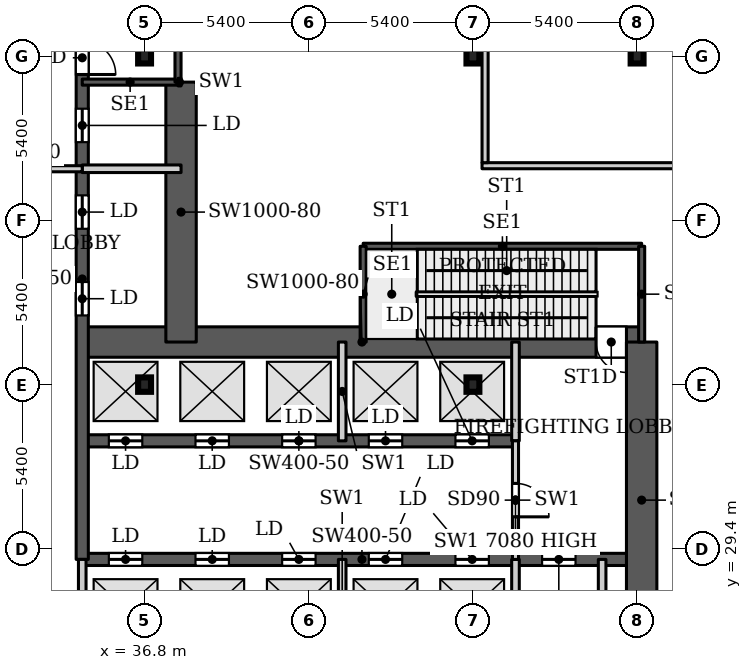
"""IFC4 building model, lengths in metres.
Left out: names, types, materials, properties, quantities, classifications, styles, units other than length and angle.
Written with IfcOpenShell. Run it as: python <this file> out.ifc"""

import sys

from ifc_helpers import new_model, si_unit, direction, frame, frame_2d, origin, origin_2d, place, context, subcontext, project, spatial, rectangle, i_section, extrude, source, transform, mapped, element, fill, save


model = new_model("IFC4")
c1 = context("Model", 3, precision=1e-05, world=origin(), true_north=direction((0.0, 1.0)))
c2 = subcontext(c1, "Body", "Model", "MODEL_VIEW")
j1 = project(units=[si_unit("LENGTHUNIT", "METRE"), si_unit("PLANEANGLEUNIT", "RADIAN")], contexts=[c1])
p1 = place(None, origin())
s1 = spatial("IfcSite", under=j1, at=p1, CompositionType="ELEMENT")
p2 = place(p1, origin())
s2 = spatial("IfcBuilding", under=s1, at=p2, CompositionType="ELEMENT")
p3 = place(p2, origin())
s3 = spatial("IfcBuildingStorey", under=s2, at=p3, CompositionType="ELEMENT", Elevation=0.0)
for number, where, z_axis, x_axis in (
    (1, (36.8, 34.8, 0.0), (0.0, 0.0, 1.0), (1.0, 0.0, 0.0)),
    (2, (47.6, 34.8, 0.0), (0.0, 0.0, 1.0), (1.0, 0.0, 0.0)),
    (3, (36.8, 45.6, 0.0), (0.0, 0.0, 1.0), (1.0, 0.0, 0.0)),
    (4, (47.6, 45.6, 0.0), (0.0, 0.0, 1.0), (1.0, 0.0, 0.0)),
    (5, (53.0, 45.6, 0.0), (0.0, 0.0, 1.0), (1.0, 0.0, 0.0)),
):
    element("IfcColumn", number, at=place(p3, frame(where, z_axis=z_axis, x_axis=x_axis)), inside=s3, PredefinedType="COLUMN", context=c2, shape_type="SweptSolid", body=[
        extrude(i_section(OverallWidth=0.424, OverallDepth=0.474, WebThickness=0.048, FlangeThickness=0.077, FilletRadius=0.014, at=origin_2d()), origin(), (0.0, 0.0, 1.0), 7.5),
    ])
p4 = place(p3, frame((34.75, 29.05, 0.0), z_axis=(0.0, 0.0, 1.0), x_axis=(1.0, 0.0, 0.0)))
e6 = element("IfcWall", 6, at=p4, inside=s3, PredefinedType="SHEAR", context=c2, shape_type="SweptSolid", body=[
    extrude(rectangle(XDim=18.4, YDim=0.4, at=frame_2d((9.2, 0.0))), origin(), (0.0, 0.0, 1.0), 7.5),
])
p5 = place(p4, frame((0.875, 0.0, 0.0)))
e7 = element("IfcOpeningElement", 7, at=p5, cuts=e6, PredefinedType="OPENING", context=c2, shape_type="SweptSolid", body=[
    extrude(rectangle(XDim=1.1, YDim=2.2, at=frame_2d((0.55, 1.1))), frame((0.0, 0.21, 0.0), z_axis=(0.0, -1.0, 0.0), x_axis=(1.0, 0.0, 0.0)), (0.0, 0.0, 1.0), 0.42),
])
p6 = place(p4, frame((3.725, 0.0, 0.0)))
e8 = element("IfcOpeningElement", 8, at=p6, cuts=e6, PredefinedType="OPENING", context=c2, shape_type="SweptSolid", body=[
    extrude(rectangle(XDim=1.1, YDim=2.2, at=frame_2d((0.55, 1.1))), frame((0.0, 0.21, 0.0), z_axis=(0.0, -1.0, 0.0), x_axis=(1.0, 0.0, 0.0)), (0.0, 0.0, 1.0), 0.42),
])
p7 = place(p4, frame((6.575, 0.0, 0.0)))
e9 = element("IfcOpeningElement", 9, at=p7, cuts=e6, PredefinedType="OPENING", context=c2, shape_type="SweptSolid", body=[
    extrude(rectangle(XDim=1.1, YDim=2.2, at=frame_2d((0.55, 1.1))), frame((0.0, 0.21, 0.0), z_axis=(0.0, -1.0, 0.0), x_axis=(1.0, 0.0, 0.0)), (0.0, 0.0, 1.0), 0.42),
])
p8 = place(p4, frame((9.425, 0.0, 0.0)))
e10 = element("IfcOpeningElement", 10, at=p8, cuts=e6, PredefinedType="OPENING", context=c2, shape_type="SweptSolid", body=[
    extrude(rectangle(XDim=1.1, YDim=2.2, at=frame_2d((0.55, 1.1))), frame((0.0, 0.21, 0.0), z_axis=(0.0, -1.0, 0.0), x_axis=(1.0, 0.0, 0.0)), (0.0, 0.0, 1.0), 0.42),
])
p9 = place(p4, frame((12.275, 0.0, 0.0)))
e11 = element("IfcOpeningElement", 11, at=p9, cuts=e6, PredefinedType="OPENING", context=c2, shape_type="SweptSolid", body=[
    extrude(rectangle(XDim=1.1, YDim=2.2, at=frame_2d((0.55, 1.1))), frame((0.0, 0.21, 0.0), z_axis=(0.0, -1.0, 0.0), x_axis=(1.0, 0.0, 0.0)), (0.0, 0.0, 1.0), 0.42),
])
p10 = place(p4, frame((15.125, 0.0, 0.0)))
e12 = element("IfcOpeningElement", 12, at=p10, cuts=e6, PredefinedType="OPENING", context=c2, shape_type="SweptSolid", body=[
    extrude(rectangle(XDim=1.1, YDim=2.2, at=frame_2d((0.55, 1.1))), frame((0.0, 0.21, 0.0), z_axis=(0.0, -1.0, 0.0), x_axis=(1.0, 0.0, 0.0)), (0.0, 0.0, 1.0), 0.42),
])
p11 = place(p3, frame((34.75, 32.95, 0.0), z_axis=(0.0, 0.0, 1.0), x_axis=(1.0, 0.0, 0.0)))
e13 = element("IfcWall", 13, at=p11, inside=s3, PredefinedType="SHEAR", context=c2, shape_type="SweptSolid", body=[
    extrude(rectangle(XDim=14.25, YDim=0.4, at=frame_2d((7.125, 0.0))), origin(), (0.0, 0.0, 1.0), 7.5),
])
p12 = place(p11, frame((0.875, 0.0, 0.0)))
e14 = element("IfcOpeningElement", 14, at=p12, cuts=e13, PredefinedType="OPENING", context=c2, shape_type="SweptSolid", body=[
    extrude(rectangle(XDim=1.1, YDim=2.2, at=frame_2d((0.55, 1.1))), frame((0.0, 0.21, 0.0), z_axis=(0.0, -1.0, 0.0), x_axis=(1.0, 0.0, 0.0)), (0.0, 0.0, 1.0), 0.42),
])
p13 = place(p11, frame((3.725, 0.0, 0.0)))
e15 = element("IfcOpeningElement", 15, at=p13, cuts=e13, PredefinedType="OPENING", context=c2, shape_type="SweptSolid", body=[
    extrude(rectangle(XDim=1.1, YDim=2.2, at=frame_2d((0.55, 1.1))), frame((0.0, 0.21, 0.0), z_axis=(0.0, -1.0, 0.0), x_axis=(1.0, 0.0, 0.0)), (0.0, 0.0, 1.0), 0.42),
])
p14 = place(p11, frame((6.575, 0.0, 0.0)))
e16 = element("IfcOpeningElement", 16, at=p14, cuts=e13, PredefinedType="OPENING", context=c2, shape_type="SweptSolid", body=[
    extrude(rectangle(XDim=1.1, YDim=2.2, at=frame_2d((0.55, 1.1))), frame((0.0, 0.21, 0.0), z_axis=(0.0, -1.0, 0.0), x_axis=(1.0, 0.0, 0.0)), (0.0, 0.0, 1.0), 0.42),
])
p15 = place(p11, frame((9.425, 0.0, 0.0)))
e17 = element("IfcOpeningElement", 17, at=p15, cuts=e13, PredefinedType="OPENING", context=c2, shape_type="SweptSolid", body=[
    extrude(rectangle(XDim=1.1, YDim=2.2, at=frame_2d((0.55, 1.1))), frame((0.0, 0.21, 0.0), z_axis=(0.0, -1.0, 0.0), x_axis=(1.0, 0.0, 0.0)), (0.0, 0.0, 1.0), 0.42),
])
p16 = place(p11, frame((12.275, 0.0, 0.0)))
e18 = element("IfcOpeningElement", 18, at=p16, cuts=e13, PredefinedType="OPENING", context=c2, shape_type="SweptSolid", body=[
    extrude(rectangle(XDim=1.1, YDim=2.2, at=frame_2d((0.55, 1.1))), frame((0.0, 0.21, 0.0), z_axis=(0.0, -1.0, 0.0), x_axis=(1.0, 0.0, 0.0)), (0.0, 0.0, 1.0), 0.42),
])
p17 = place(p3, frame((34.75, 36.2, 0.0), z_axis=(0.0, 0.0, 1.0), x_axis=(1.0, 0.0, 0.0)))
e19 = element("IfcWall", 19, at=p17, inside=s3, PredefinedType="SHEAR", context=c2, shape_type="SweptSolid", body=[
    extrude(rectangle(XDim=18.4, YDim=1.0, at=frame_2d((9.2, 0.0))), origin(), (0.0, 0.0, 1.0), 7.5),
])
p18 = place(p17, frame((16.9, 0.0, 0.0)))
e20 = element("IfcOpeningElement", 20, at=p18, cuts=e19, PredefinedType="OPENING", context=c2, shape_type="SweptSolid", body=[
    extrude(rectangle(XDim=1.0, YDim=2.2, at=frame_2d((0.5, 1.1))), frame((0.0, 0.51, 0.0), z_axis=(0.0, -1.0, 0.0), x_axis=(1.0, 0.0, 0.0)), (0.0, 0.0, 1.0), 1.02),
])
p19 = place(p3, frame((34.75, 29.05, 0.0), z_axis=(0.0, 0.0, 1.0), x_axis=(0.0, 1.0, 0.0)))
e21 = element("IfcWall", 21, at=p19, inside=s3, PredefinedType="SHEAR", context=c2, shape_type="SweptSolid", body=[
    extrude(rectangle(XDim=18.45, YDim=0.4, at=frame_2d((9.225, 0.0))), origin(), (0.0, 0.0, 1.0), 7.5),
])
p20 = place(p19, frame((8.025, 0.0, 0.0)))
e22 = element("IfcOpeningElement", 22, at=p20, cuts=e21, PredefinedType="OPENING", context=c2, shape_type="SweptSolid", body=[
    extrude(rectangle(XDim=1.1, YDim=2.2, at=frame_2d((0.55, 1.1))), frame((0.0, 0.21, 0.0), z_axis=(0.0, -1.0, 0.0), x_axis=(1.0, 0.0, 0.0)), (0.0, 0.0, 1.0), 0.42),
])
p21 = place(p19, frame((10.875, 0.0, 0.0)))
e23 = element("IfcOpeningElement", 23, at=p21, cuts=e21, PredefinedType="OPENING", context=c2, shape_type="SweptSolid", body=[
    extrude(rectangle(XDim=1.1, YDim=2.2, at=frame_2d((0.55, 1.1))), frame((0.0, 0.21, 0.0), z_axis=(0.0, -1.0, 0.0), x_axis=(1.0, 0.0, 0.0)), (0.0, 0.0, 1.0), 0.42),
])
p22 = place(p19, frame((13.725, 0.0, 0.0)))
e24 = element("IfcOpeningElement", 24, at=p22, cuts=e21, PredefinedType="OPENING", context=c2, shape_type="SweptSolid", body=[
    extrude(rectangle(XDim=1.1, YDim=2.2, at=frame_2d((0.55, 1.1))), frame((0.0, 0.21, 0.0), z_axis=(0.0, -1.0, 0.0), x_axis=(1.0, 0.0, 0.0)), (0.0, 0.0, 1.0), 0.42),
])
p23 = place(p19, frame((15.95, 0.0, 0.0)))
e25 = element("IfcOpeningElement", 25, at=p23, cuts=e21, PredefinedType="OPENING", context=c2, shape_type="SweptSolid", body=[
    extrude(rectangle(XDim=1.1, YDim=2.2, at=frame_2d((0.55, 1.1))), frame((0.0, 0.21, 0.0), z_axis=(0.0, -1.0, 0.0), x_axis=(1.0, 0.0, 0.0)), (0.0, 0.0, 1.0), 0.42),
])
p24 = place(p3, frame((38.0, 36.2, 0.0), z_axis=(0.0, 0.0, 1.0), x_axis=(0.0, 1.0, 0.0)))
e26 = element("IfcWall", 26, at=p24, inside=s3, PredefinedType="SHEAR", context=c2, shape_type="SweptSolid", body=[
    extrude(rectangle(XDim=8.55, YDim=1.0, at=frame_2d((4.275, 0.0))), origin(), (0.0, 0.0, 1.0), 7.5),
])
p25 = place(p3, frame((53.15, 25.8, 0.0), z_axis=(0.0, 0.0, 1.0), x_axis=(0.0, 1.0, 0.0)))
e27 = element("IfcWall", 27, at=p25, inside=s3, PredefinedType="SHEAR", context=c2, shape_type="SweptSolid", body=[
    extrude(rectangle(XDim=10.4, YDim=1.0, at=frame_2d((5.2, 0.0))), origin(), (0.0, 0.0, 1.0), 7.5),
])
p26 = place(p3, frame((43.99, 39.35, 0.0), z_axis=(0.0, 0.0, 1.0), x_axis=(1.0, 0.0, 0.0)))
e28 = element("IfcWall", 28, at=p26, inside=s3, PredefinedType="SHEAR", context=c2, shape_type="SweptSolid", body=[
    extrude(rectangle(XDim=9.16, YDim=0.2, at=frame_2d((4.58, 0.0))), origin(), (0.0, 0.0, 1.0), 7.5),
])
for number, where, z_axis, x_axis in (
    (29, (43.99, 36.2, 0.0), (0.0, 0.0, 1.0), (0.0, 1.0, 0.0)),
    (30, (53.15, 36.2, 0.0), (0.0, 0.0, 1.0), (0.0, 1.0, 0.0)),
):
    element("IfcWall", number, at=place(p3, frame(where, z_axis=z_axis, x_axis=x_axis)), inside=s3, PredefinedType="SHEAR", context=c2, shape_type="SweptSolid", body=[
        extrude(rectangle(XDim=3.15, YDim=0.2, at=frame_2d((1.575, 0.0))), origin(), (0.0, 0.0, 1.0), 7.5),
    ])
p27 = place(p3, frame((34.75, 44.75, 0.0), z_axis=(0.0, 0.0, 1.0), x_axis=(1.0, 0.0, 0.0)))
e31 = element("IfcWall", 31, at=p27, inside=s3, PredefinedType="SHEAR", context=c2, shape_type="SweptSolid", body=[
    extrude(rectangle(XDim=3.15, YDim=0.2, at=frame_2d((1.575, 0.0))), origin(), (0.0, 0.0, 1.0), 7.5),
])
p28 = place(p3, frame((37.9, 44.75, 0.0), z_axis=(0.0, 0.0, 1.0), x_axis=(0.0, 1.0, 0.0)))
e32 = element("IfcWall", 32, at=p28, inside=s3, PredefinedType="SHEAR", context=c2, shape_type="SweptSolid", body=[
    extrude(rectangle(XDim=9.16, YDim=0.2, at=frame_2d((4.58, 0.0))), origin(), (0.0, 0.0, 1.0), 7.5),
])
for number, where, z_axis, x_axis in (
    (33, (34.75, 25.8, 0.0), (0.0, 0.0, 1.0), (0.0, 1.0, 0.0)),
    (34, (43.3, 25.8, 0.0), (0.0, 0.0, 1.0), (0.0, 1.0, 0.0)),
    (35, (43.3, 32.95, 0.0), (0.0, 0.0, 1.0), (0.0, 1.0, 0.0)),
    (36, (49.0, 25.8, 0.0), (0.0, 0.0, 1.0), (0.0, 1.0, 0.0)),
    (37, (49.0, 32.95, 0.0), (0.0, 0.0, 1.0), (0.0, 1.0, 0.0)),
    (38, (51.85, 25.8, 0.0), (0.0, 0.0, 1.0), (0.0, 1.0, 0.0)),
    (39, (34.75, 41.9, 0.0), (0.0, 0.0, 1.0), (1.0, 0.0, 0.0)),
):
    element("IfcWall", number, at=place(p3, frame(where, z_axis=z_axis, x_axis=x_axis)), inside=s3, PredefinedType="PARTITIONING", context=c2, shape_type="SweptSolid", body=[
        extrude(rectangle(XDim=3.25, YDim=0.25, at=frame_2d((1.625, 0.0))), origin(), (0.0, 0.0, 1.0), 7.5),
    ])
p29 = place(p3, frame((37.9, 44.75, 0.0), z_axis=(0.0, 0.0, 1.0), x_axis=(1.0, 0.0, 0.0)))
e40 = element("IfcWall", 40, at=p29, inside=s3, PredefinedType="PARTITIONING", context=c2, shape_type="SweptSolid", body=[
    extrude(rectangle(XDim=0.1, YDim=0.25, at=frame_2d((0.05, 0.0))), origin(), (0.0, 0.0, 1.0), 7.5),
])
p30 = place(p3, frame((49.0, 29.05, 0.0), z_axis=(0.0, 0.0, 1.0), x_axis=(0.0, 1.0, 0.0)))
e41 = element("IfcWall", 41, at=p30, inside=s3, PredefinedType="PARTITIONING", context=c2, shape_type="SweptSolid", body=[
    extrude(rectangle(XDim=3.9, YDim=0.2, at=frame_2d((1.95, 0.0))), origin(), (0.0, 0.0, 1.0), 7.08),
])
p31 = place(p30, frame((1.4, 0.0, 0.0)))
e42 = element("IfcOpeningElement", 42, at=p31, cuts=e41, PredefinedType="OPENING", context=c2, shape_type="SweptSolid", body=[
    extrude(rectangle(XDim=1.1, YDim=2.2, at=frame_2d((0.55, 1.1))), frame((0.0, 0.11, 0.0), z_axis=(0.0, -1.0, 0.0), x_axis=(1.0, 0.0, 0.0)), (0.0, 0.0, 1.0), 0.22),
])
p32 = place(p3, frame((30.5, 41.9, 0.0), z_axis=(0.0, 0.0, 1.0), x_axis=(1.0, 0.0, 0.0)))
e43 = element("IfcWall", 43, at=p32, inside=s3, PredefinedType="PARTITIONING", context=c2, shape_type="SweptSolid", body=[
    extrude(rectangle(XDim=4.25, YDim=0.2, at=frame_2d((2.125, 0.0))), origin(), (0.0, 0.0, 1.0), 7.08),
])
p33 = place(p32, frame((1.575, 0.0, 0.0)))
e44 = element("IfcOpeningElement", 44, at=p33, cuts=e43, PredefinedType="OPENING", context=c2, shape_type="SweptSolid", body=[
    extrude(rectangle(XDim=1.1, YDim=2.2, at=frame_2d((0.55, 1.1))), frame((0.0, 0.11, 0.0), z_axis=(0.0, -1.0, 0.0), x_axis=(1.0, 0.0, 0.0)), (0.0, 0.0, 1.0), 0.22),
])
p34 = place(p3, frame((47.9, 42.0, 0.0), z_axis=(0.0, 0.0, 1.0), x_axis=(1.0, 0.0, 0.0)))
e45 = element("IfcWall", 45, at=p34, inside=s3, PredefinedType="PARTITIONING", context=c2, shape_type="SweptSolid", body=[
    extrude(rectangle(XDim=64.1, YDim=0.2, at=frame_2d((32.05, 0.0))), origin(), (0.0, 0.0, 1.0), 7.08),
])
p35 = place(p34, frame((47.5, 0.0, 0.0)))
e46 = element("IfcOpeningElement", 46, at=p35, cuts=e45, PredefinedType="OPENING", context=c2, shape_type="SweptSolid", body=[
    extrude(rectangle(XDim=1.0, YDim=2.1, at=frame_2d((0.5, 1.05))), frame((0.0, 0.11, 0.0), z_axis=(0.0, -1.0, 0.0), x_axis=(1.0, 0.0, 0.0)), (0.0, 0.0, 1.0), 0.22),
])
p36 = place(p34, frame((55.5, 0.0, 0.0)))
e47 = element("IfcOpeningElement", 47, at=p36, cuts=e45, PredefinedType="OPENING", context=c2, shape_type="SweptSolid", body=[
    extrude(rectangle(XDim=1.0, YDim=2.1, at=frame_2d((0.5, 1.05))), frame((0.0, 0.11, 0.0), z_axis=(0.0, -1.0, 0.0), x_axis=(1.0, 0.0, 0.0)), (0.0, 0.0, 1.0), 0.22),
])
p37 = place(p3, frame((48.0, 42.1, 0.0), z_axis=(0.0, 0.0, 1.0), x_axis=(0.0, 1.0, 0.0)))
e48 = element("IfcWall", 48, at=p37, inside=s3, PredefinedType="PARTITIONING", context=c2, shape_type="SweptSolid", body=[
    extrude(rectangle(XDim=29.9, YDim=0.2, at=frame_2d((14.95, 0.0))), origin(), (0.0, 0.0, 1.0), 7.08),
])
p38 = place(p37, frame((25.8, 0.0, 0.0)))
e49 = element("IfcOpeningElement", 49, at=p38, cuts=e48, PredefinedType="OPENING", context=c2, shape_type="SweptSolid", body=[
    extrude(rectangle(XDim=2.4, YDim=2.1, at=frame_2d((1.2, 1.05))), frame((0.0, 0.11, 0.0), z_axis=(0.0, -1.0, 0.0), x_axis=(1.0, 0.0, 0.0)), (0.0, 0.0, 1.0), 0.22),
])
m1 = source(origin(), c2, "Body", "SweptSolid", [
    extrude(rectangle(XDim=1.1, YDim=2.2, at=frame_2d((0.55, 1.1))), frame((0.0, 0.025, 0.0), z_axis=(0.0, -1.0, 0.0), x_axis=(1.0, 0.0, 0.0)), (0.0, 0.0, 1.0), 0.05),
])
p39 = place(p5, origin())
e50 = element("IfcDoor", 50, at=p39, inside=s3, OperationType="SLIDING_TO_LEFT", PredefinedType="DOOR", context=c2, shape_type="MappedRepresentation", body=[
    mapped(m1, transform((0.0, 0.0, 0.0), x_axis=(1.0, 0.0, 0.0), y_axis=(0.0, 1.0, 0.0), z_axis=(0.0, 0.0, 1.0), scale=1.0)),
])
fill(e7, e50)
p40 = place(p6, origin())
e51 = element("IfcDoor", 51, at=p40, inside=s3, OperationType="SLIDING_TO_LEFT", PredefinedType="DOOR", context=c2, shape_type="MappedRepresentation", body=[
    mapped(m1, transform((0.0, 0.0, 0.0), x_axis=(1.0, 0.0, 0.0), y_axis=(0.0, 1.0, 0.0), z_axis=(0.0, 0.0, 1.0), scale=1.0)),
])
fill(e8, e51)
p41 = place(p7, origin())
e52 = element("IfcDoor", 52, at=p41, inside=s3, OperationType="SLIDING_TO_LEFT", PredefinedType="DOOR", context=c2, shape_type="MappedRepresentation", body=[
    mapped(m1, transform((0.0, 0.0, 0.0), x_axis=(1.0, 0.0, 0.0), y_axis=(0.0, 1.0, 0.0), z_axis=(0.0, 0.0, 1.0), scale=1.0)),
])
fill(e9, e52)
p42 = place(p8, origin())
e53 = element("IfcDoor", 53, at=p42, inside=s3, OperationType="SLIDING_TO_LEFT", PredefinedType="DOOR", context=c2, shape_type="MappedRepresentation", body=[
    mapped(m1, transform((0.0, 0.0, 0.0), x_axis=(1.0, 0.0, 0.0), y_axis=(0.0, 1.0, 0.0), z_axis=(0.0, 0.0, 1.0), scale=1.0)),
])
fill(e10, e53)
p43 = place(p9, origin())
e54 = element("IfcDoor", 54, at=p43, inside=s3, OperationType="SLIDING_TO_LEFT", PredefinedType="DOOR", context=c2, shape_type="MappedRepresentation", body=[
    mapped(m1, transform((0.0, 0.0, 0.0), x_axis=(1.0, 0.0, 0.0), y_axis=(0.0, 1.0, 0.0), z_axis=(0.0, 0.0, 1.0), scale=1.0)),
])
fill(e11, e54)
p44 = place(p12, origin())
e55 = element("IfcDoor", 55, at=p44, inside=s3, OperationType="SLIDING_TO_LEFT", PredefinedType="DOOR", context=c2, shape_type="MappedRepresentation", body=[
    mapped(m1, transform((0.0, 0.0, 0.0), x_axis=(1.0, 0.0, 0.0), y_axis=(0.0, 1.0, 0.0), z_axis=(0.0, 0.0, 1.0), scale=1.0)),
])
fill(e14, e55)
p45 = place(p13, origin())
e56 = element("IfcDoor", 56, at=p45, inside=s3, OperationType="SLIDING_TO_LEFT", PredefinedType="DOOR", context=c2, shape_type="MappedRepresentation", body=[
    mapped(m1, transform((0.0, 0.0, 0.0), x_axis=(1.0, 0.0, 0.0), y_axis=(0.0, 1.0, 0.0), z_axis=(0.0, 0.0, 1.0), scale=1.0)),
])
fill(e15, e56)
p46 = place(p14, origin())
e57 = element("IfcDoor", 57, at=p46, inside=s3, OperationType="SLIDING_TO_LEFT", PredefinedType="DOOR", context=c2, shape_type="MappedRepresentation", body=[
    mapped(m1, transform((0.0, 0.0, 0.0), x_axis=(1.0, 0.0, 0.0), y_axis=(0.0, 1.0, 0.0), z_axis=(0.0, 0.0, 1.0), scale=1.0)),
])
fill(e16, e57)
p47 = place(p15, origin())
e58 = element("IfcDoor", 58, at=p47, inside=s3, OperationType="SLIDING_TO_LEFT", PredefinedType="DOOR", context=c2, shape_type="MappedRepresentation", body=[
    mapped(m1, transform((0.0, 0.0, 0.0), x_axis=(1.0, 0.0, 0.0), y_axis=(0.0, 1.0, 0.0), z_axis=(0.0, 0.0, 1.0), scale=1.0)),
])
fill(e17, e58)
p48 = place(p16, origin())
e59 = element("IfcDoor", 59, at=p48, inside=s3, OperationType="SLIDING_TO_LEFT", PredefinedType="DOOR", context=c2, shape_type="MappedRepresentation", body=[
    mapped(m1, transform((0.0, 0.0, 0.0), x_axis=(1.0, 0.0, 0.0), y_axis=(0.0, 1.0, 0.0), z_axis=(0.0, 0.0, 1.0), scale=1.0)),
])
fill(e18, e59)
p49 = place(p20, origin())
e60 = element("IfcDoor", 60, at=p49, inside=s3, OperationType="SLIDING_TO_LEFT", PredefinedType="DOOR", context=c2, shape_type="MappedRepresentation", body=[
    mapped(m1, transform((0.0, 0.0, 0.0), x_axis=(1.0, 0.0, 0.0), y_axis=(0.0, 1.0, 0.0), z_axis=(0.0, 0.0, 1.0), scale=1.0)),
])
fill(e22, e60)
p50 = place(p21, origin())
e61 = element("IfcDoor", 61, at=p50, inside=s3, OperationType="SLIDING_TO_LEFT", PredefinedType="DOOR", context=c2, shape_type="MappedRepresentation", body=[
    mapped(m1, transform((0.0, 0.0, 0.0), x_axis=(1.0, 0.0, 0.0), y_axis=(0.0, 1.0, 0.0), z_axis=(0.0, 0.0, 1.0), scale=1.0)),
])
fill(e23, e61)
p51 = place(p22, origin())
e62 = element("IfcDoor", 62, at=p51, inside=s3, OperationType="SLIDING_TO_LEFT", PredefinedType="DOOR", context=c2, shape_type="MappedRepresentation", body=[
    mapped(m1, transform((0.0, 0.0, 0.0), x_axis=(1.0, 0.0, 0.0), y_axis=(0.0, 1.0, 0.0), z_axis=(0.0, 0.0, 1.0), scale=1.0)),
])
fill(e24, e62)
p52 = place(p10, origin())
e63 = element("IfcDoor", 63, at=p52, inside=s3, OperationType="SLIDING_TO_LEFT", PredefinedType="DOOR", context=c2, shape_type="MappedRepresentation", body=[
    mapped(m1, transform((0.0, 0.0, 0.0), x_axis=(1.0, 0.0, 0.0), y_axis=(0.0, 1.0, 0.0), z_axis=(0.0, 0.0, 1.0), scale=1.0)),
])
fill(e12, e63)
m2 = source(origin(), c2, "Body", "SweptSolid", [
    extrude(rectangle(XDim=1.1, YDim=2.2, at=frame_2d((0.55, 1.1))), frame((0.0, 0.025, 0.0), z_axis=(0.0, -1.0, 0.0), x_axis=(1.0, 0.0, 0.0)), (0.0, 0.0, 1.0), 0.05),
])
p53 = place(p31, origin())
e64 = element("IfcDoor", 64, at=p53, inside=s3, OperationType="SINGLE_SWING_RIGHT", PredefinedType="DOOR", context=c2, shape_type="MappedRepresentation", body=[
    mapped(m2, transform((0.0, 0.0, 0.0), x_axis=(1.0, 0.0, 0.0), y_axis=(0.0, 1.0, 0.0), z_axis=(0.0, 0.0, 1.0), scale=1.0)),
])
fill(e42, e64)
m3 = source(origin(), c2, "Body", "SweptSolid", [
    extrude(rectangle(XDim=1.0, YDim=2.2, at=frame_2d((0.5, 1.1))), frame((0.0, 0.025, 0.0), z_axis=(0.0, -1.0, 0.0), x_axis=(1.0, 0.0, 0.0)), (0.0, 0.0, 1.0), 0.05),
])
p54 = place(p18, origin())
e65 = element("IfcDoor", 65, at=p54, inside=s3, OperationType="SINGLE_SWING_RIGHT", PredefinedType="DOOR", context=c2, shape_type="MappedRepresentation", body=[
    mapped(m3, transform((0.0, 0.0, 0.0), x_axis=(1.0, 0.0, 0.0), y_axis=(0.0, 1.0, 0.0), z_axis=(0.0, 0.0, 1.0), scale=1.0)),
])
fill(e20, e65)
p55 = place(p23, origin())
e66 = element("IfcDoor", 66, at=p55, inside=s3, OperationType="SINGLE_SWING_RIGHT", PredefinedType="DOOR", context=c2, shape_type="MappedRepresentation", body=[
    mapped(m2, transform((0.0, 0.0, 0.0), x_axis=(1.0, 0.0, 0.0), y_axis=(0.0, 1.0, 0.0), z_axis=(0.0, 0.0, 1.0), scale=1.0)),
])
fill(e25, e66)
save(model, sys.argv[1])
